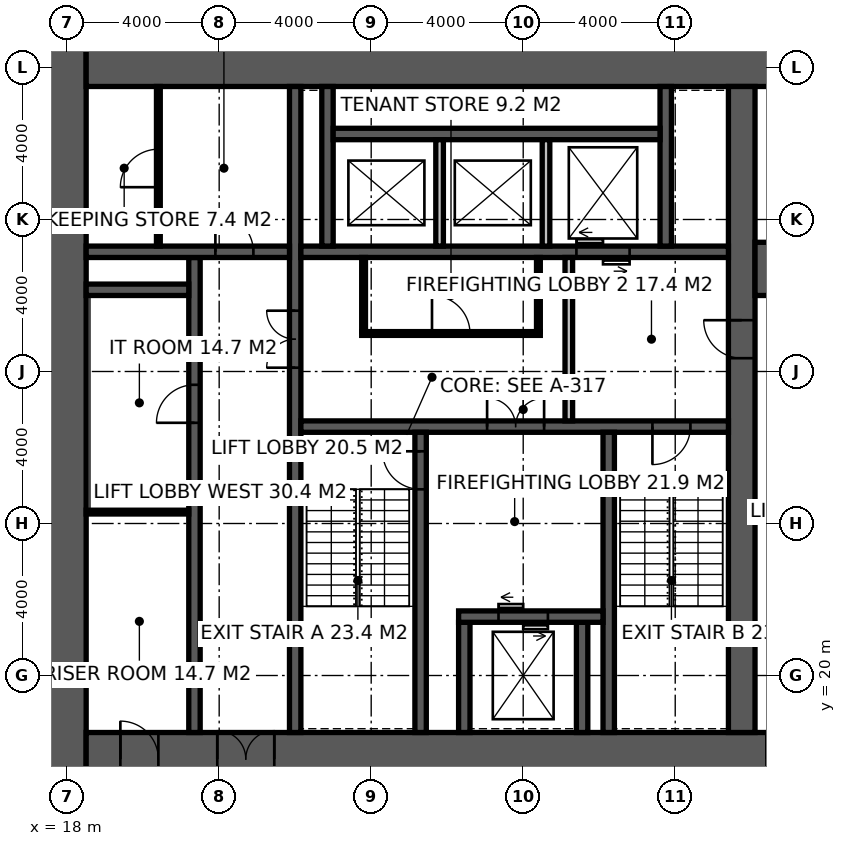
"""IFC4 building model, lengths in metres.
Left out: names, types, materials, properties, quantities, classifications, styles, units other than length and angle.
Written with IfcOpenShell. Run it as: python <this file> out.ifc"""

import sys

from ifc_helpers import new_model, si_unit, direction, frame, frame_2d, origin, place, context, subcontext, project, spatial, rectangle, extrude, element, fill, save


model = new_model("IFC4")
c1 = context("Model", 3, precision=1e-05, world=origin(), true_north=direction((0.0, 1.0)))
c2 = subcontext(c1, "Body", "Model", "MODEL_VIEW")
j1 = project(units=[si_unit("LENGTHUNIT", "METRE"), si_unit("PLANEANGLEUNIT", "RADIAN")], contexts=[c1])
p1 = place(None, origin())
s1 = spatial("IfcSite", under=j1, at=p1, CompositionType="ELEMENT")
p2 = place(p1, origin())
s2 = spatial("IfcBuilding", under=s1, at=p2, CompositionType="ELEMENT")
p3 = place(p2, frame((0.0, 0.0, 67.0)))
s3 = spatial("IfcBuildingStorey", under=s2, at=p3, CompositionType="ELEMENT", Elevation=67.0)
p4 = place(p3, frame((18.0, 17.1, -0.15), z_axis=(0.0, 0.0, 1.0), x_axis=(0.0, 1.0, 0.0)))
e1 = element("IfcWall", 1, at=p4, inside=s3, PredefinedType="SHEAR", context=c2, shape_type="SweptSolid", body=[
    extrude(rectangle(XDim=19.8, YDim=1.0, at=frame_2d((9.9, 0.0))), origin(), (0.0, 0.0, 1.0), 4.0),
])
p5 = place(p3, frame((18.5, 17.8, -0.15), z_axis=(0.0, 0.0, 1.0), x_axis=(1.0, 0.0, 0.0)))
e2 = element("IfcWall", 2, at=p5, inside=s3, PredefinedType="SHEAR", context=c2, shape_type="SweptSolid", body=[
    extrude(rectangle(XDim=23.7, YDim=1.4, at=frame_2d((11.85, 0.0))), origin(), (0.0, 0.0, 1.0), 4.0),
])
p6 = place(p5, frame((3.45, 0.0, 0.15)))
e3 = element("IfcOpeningElement", 3, at=p6, cuts=e2, PredefinedType="OPENING", context=c2, shape_type="SweptSolid", body=[
    extrude(rectangle(XDim=1.5, YDim=2.4, at=frame_2d((0.75, 1.2))), frame((0.0, 0.71, 0.0), z_axis=(0.0, -1.0, 0.0), x_axis=(1.0, 0.0, 0.0)), (0.0, 0.0, 1.0), 1.42),
])
p7 = place(p5, frame((17.9, 0.0, 0.15)))
e4 = element("IfcOpeningElement", 4, at=p7, cuts=e2, PredefinedType="OPENING", context=c2, shape_type="SweptSolid", body=[
    extrude(rectangle(XDim=1.5, YDim=2.4, at=frame_2d((0.75, 1.2))), frame((0.0, 0.71, 0.0), z_axis=(0.0, -1.0, 0.0), x_axis=(1.0, 0.0, 0.0)), (0.0, 0.0, 1.0), 1.42),
])
p8 = place(p5, frame((0.9, 0.0, 0.15)))
e5 = element("IfcOpeningElement", 5, at=p8, cuts=e2, PredefinedType="OPENING", context=c2, shape_type="SweptSolid", body=[
    extrude(rectangle(XDim=1.0, YDim=2.2, at=frame_2d((0.5, 1.1))), frame((0.0, 0.71, 0.0), z_axis=(0.0, -1.0, 0.0), x_axis=(1.0, 0.0, 0.0)), (0.0, 0.0, 1.0), 1.42),
])
p9 = place(p3, frame((18.5, 36.2, -0.15), z_axis=(0.0, 0.0, 1.0), x_axis=(1.0, 0.0, 0.0)))
e6 = element("IfcWall", 6, at=p9, inside=s3, PredefinedType="SHEAR", context=c2, shape_type="SweptSolid", body=[
    extrude(rectangle(XDim=23.7, YDim=1.4, at=frame_2d((11.85, 0.0))), origin(), (0.0, 0.0, 1.0), 4.0),
])
p10 = place(p3, frame((35.75, 18.5, -0.15), z_axis=(0.0, 0.0, 1.0), x_axis=(0.0, 1.0, 0.0)))
e7 = element("IfcWall", 7, at=p10, inside=s3, PredefinedType="SHEAR", context=c2, shape_type="SweptSolid", body=[
    extrude(rectangle(XDim=17.0, YDim=0.7, at=frame_2d((8.5, 0.0))), origin(), (0.0, 0.0, 1.0), 4.0),
])
p11 = place(p10, frame((9.85, 0.0, 0.15)))
e8 = element("IfcOpeningElement", 8, at=p11, cuts=e7, PredefinedType="OPENING", context=c2, shape_type="SweptSolid", body=[
    extrude(rectangle(XDim=1.0, YDim=2.2, at=frame_2d((0.5, 1.1))), frame((0.0, 0.36, 0.0), z_axis=(0.0, -1.0, 0.0), x_axis=(1.0, 0.0, 0.0)), (0.0, 0.0, 1.0), 0.72),
])
p12 = place(p3, frame((24.0, 18.5, -0.15), z_axis=(0.0, 0.0, 1.0), x_axis=(0.0, 1.0, 0.0)))
e9 = element("IfcWall", 9, at=p12, inside=s3, PredefinedType="SHEAR", context=c2, shape_type="SweptSolid", body=[
    extrude(rectangle(XDim=17.0, YDim=0.3, at=frame_2d((8.5, 0.0))), origin(), (0.0, 0.0, 1.0), 4.0),
])
p13 = place(p12, frame((9.6, 0.0, 0.15)))
e10 = element("IfcOpeningElement", 10, at=p13, cuts=e9, PredefinedType="OPENING", context=c2, shape_type="SweptSolid", body=[
    extrude(rectangle(XDim=1.5, YDim=2.4, at=frame_2d((0.75, 1.2))), frame((0.0, 0.16, 0.0), z_axis=(0.0, -1.0, 0.0), x_axis=(1.0, 0.0, 0.0)), (0.0, 0.0, 1.0), 0.32),
])
p14 = place(p3, frame((24.15, 26.55, -0.15), z_axis=(0.0, 0.0, 1.0), x_axis=(1.0, 0.0, 0.0)))
e11 = element("IfcWall", 11, at=p14, inside=s3, PredefinedType="SHEAR", context=c2, shape_type="SweptSolid", body=[
    extrude(rectangle(XDim=11.25, YDim=0.3, at=frame_2d((5.625, 0.0))), origin(), (0.0, 0.0, 1.0), 4.0),
])
p15 = place(p14, frame((9.25, 0.0, 0.15)))
e12 = element("IfcOpeningElement", 12, at=p15, cuts=e11, PredefinedType="OPENING", context=c2, shape_type="SweptSolid", body=[
    extrude(rectangle(XDim=1.0, YDim=2.2, at=frame_2d((0.5, 1.1))), frame((0.0, 0.16, 0.0), z_axis=(0.0, -1.0, 0.0), x_axis=(1.0, 0.0, 0.0)), (0.0, 0.0, 1.0), 0.32),
])
p16 = place(p14, frame((4.9, 0.0, 0.15)))
e13 = element("IfcOpeningElement", 13, at=p16, cuts=e11, PredefinedType="OPENING", context=c2, shape_type="SweptSolid", body=[
    extrude(rectangle(XDim=1.5, YDim=2.4, at=frame_2d((0.75, 1.2))), frame((0.0, 0.16, 0.0), z_axis=(0.0, -1.0, 0.0), x_axis=(1.0, 0.0, 0.0)), (0.0, 0.0, 1.0), 0.32),
])
p17 = place(p3, frame((27.3, 18.5, -0.15), z_axis=(0.0, 0.0, 1.0), x_axis=(0.0, 1.0, 0.0)))
e14 = element("IfcWall", 14, at=p17, inside=s3, PredefinedType="SHEAR", context=c2, shape_type="SweptSolid", body=[
    extrude(rectangle(XDim=7.9, YDim=0.3, at=frame_2d((3.95, 0.0))), origin(), (0.0, 0.0, 1.0), 4.0),
])
p18 = place(p17, frame((6.4, 0.0, 0.15)))
e15 = element("IfcOpeningElement", 15, at=p18, cuts=e14, PredefinedType="OPENING", context=c2, shape_type="SweptSolid", body=[
    extrude(rectangle(XDim=1.0, YDim=2.2, at=frame_2d((0.5, 1.1))), frame((0.0, 0.16, 0.0), z_axis=(0.0, -1.0, 0.0), x_axis=(1.0, 0.0, 0.0)), (0.0, 0.0, 1.0), 0.32),
])
p19 = place(p3, frame((32.25, 18.5, -0.15), z_axis=(0.0, 0.0, 1.0), x_axis=(0.0, 1.0, 0.0)))
e16 = element("IfcWall", 16, at=p19, inside=s3, PredefinedType="SHEAR", context=c2, shape_type="SweptSolid", body=[
    extrude(rectangle(XDim=7.9, YDim=0.3, at=frame_2d((3.95, 0.0))), origin(), (0.0, 0.0, 1.0), 4.0),
])
for number, where, z_axis, x_axis in (
    (17, (28.45, 18.5, -0.15), (0.0, 0.0, 1.0), (0.0, 1.0, 0.0)),
    (18, (31.55, 18.5, -0.15), (0.0, 0.0, 1.0), (0.0, 1.0, 0.0)),
):
    element("IfcWall", number, at=place(p3, frame(where, z_axis=z_axis, x_axis=x_axis)), inside=s3, PredefinedType="SHEAR", context=c2, shape_type="SweptSolid", body=[
        extrude(rectangle(XDim=2.9, YDim=0.3, at=frame_2d((1.45, 0.0))), origin(), (0.0, 0.0, 1.0), 4.0),
    ])
p20 = place(p3, frame((28.3, 21.55, -0.15), z_axis=(0.0, 0.0, 1.0), x_axis=(1.0, 0.0, 0.0)))
e19 = element("IfcWall", 19, at=p20, inside=s3, PredefinedType="SHEAR", context=c2, shape_type="SweptSolid", body=[
    extrude(rectangle(XDim=3.8, YDim=0.3, at=frame_2d((1.9, 0.0))), origin(), (0.0, 0.0, 1.0), 4.0),
])
p21 = place(p20, frame((1.05, 0.0, 0.15)))
e20 = element("IfcOpeningElement", 20, at=p21, cuts=e19, PredefinedType="OPENING", context=c2, shape_type="SweptSolid", body=[
    extrude(rectangle(XDim=1.3, YDim=2.4, at=frame_2d((0.65, 1.2))), frame((0.0, 0.16, 0.0), z_axis=(0.0, -1.0, 0.0), x_axis=(1.0, 0.0, 0.0)), (0.0, 0.0, 1.0), 0.32),
])
p22 = place(p3, frame((24.15, 31.15, -0.15), z_axis=(0.0, 0.0, 1.0), x_axis=(1.0, 0.0, 0.0)))
e21 = element("IfcWall", 21, at=p22, inside=s3, PredefinedType="SHEAR", context=c2, shape_type="SweptSolid", body=[
    extrude(rectangle(XDim=11.25, YDim=0.3, at=frame_2d((5.625, 0.0))), origin(), (0.0, 0.0, 1.0), 4.0),
])
p23 = place(p22, frame((7.25, 0.0, 0.15)))
e22 = element("IfcOpeningElement", 22, at=p23, cuts=e21, PredefinedType="OPENING", context=c2, shape_type="SweptSolid", body=[
    extrude(rectangle(XDim=1.4, YDim=2.4, at=frame_2d((0.7, 1.2))), frame((0.0, 0.16, 0.0), z_axis=(0.0, -1.0, 0.0), x_axis=(1.0, 0.0, 0.0)), (0.0, 0.0, 1.0), 0.32),
])
p24 = place(p3, frame((21.35, 18.5, -0.15), z_axis=(0.0, 0.0, 1.0), x_axis=(0.0, 1.0, 0.0)))
e23 = element("IfcWall", 23, at=p24, inside=s3, PredefinedType="SHEAR", context=c2, shape_type="SweptSolid", body=[
    extrude(rectangle(XDim=12.5, YDim=0.3, at=frame_2d((6.25, 0.0))), origin(), (0.0, 0.0, 1.0), 4.0),
])
p25 = place(p24, frame((8.15, 0.0, 0.15)))
e24 = element("IfcOpeningElement", 24, at=p25, cuts=e23, PredefinedType="OPENING", context=c2, shape_type="SweptSolid", body=[
    extrude(rectangle(XDim=1.0, YDim=2.2, at=frame_2d((0.5, 1.1))), frame((0.0, 0.16, 0.0), z_axis=(0.0, -1.0, 0.0), x_axis=(1.0, 0.0, 0.0)), (0.0, 0.0, 1.0), 0.32),
])
p26 = place(p3, frame((18.5, 31.15, -0.15), z_axis=(0.0, 0.0, 1.0), x_axis=(1.0, 0.0, 0.0)))
e25 = element("IfcWall", 25, at=p26, inside=s3, PredefinedType="SHEAR", context=c2, shape_type="SweptSolid", body=[
    extrude(rectangle(XDim=5.35, YDim=0.3, at=frame_2d((2.675, 0.0))), origin(), (0.0, 0.0, 1.0), 4.0),
])
p27 = place(p26, frame((3.4, 0.0, 0.15)))
e26 = element("IfcOpeningElement", 26, at=p27, cuts=e25, PredefinedType="OPENING", context=c2, shape_type="SweptSolid", body=[
    extrude(rectangle(XDim=1.0, YDim=2.2, at=frame_2d((0.5, 1.1))), frame((0.0, 0.16, 0.0), z_axis=(0.0, -1.0, 0.0), x_axis=(1.0, 0.0, 0.0)), (0.0, 0.0, 1.0), 0.32),
])
p28 = place(p3, frame((18.5, 30.15, -0.15), z_axis=(0.0, 0.0, 1.0), x_axis=(1.0, 0.0, 0.0)))
e27 = element("IfcWall", 27, at=p28, inside=s3, PredefinedType="SHEAR", context=c2, shape_type="SweptSolid", body=[
    extrude(rectangle(XDim=2.7, YDim=0.3, at=frame_2d((1.35, 0.0))), origin(), (0.0, 0.0, 1.0), 4.0),
])
for number, where, z_axis, x_axis in (
    (28, (24.85, 31.3, -0.15), (0.0, 0.0, 1.0), (0.0, 1.0, 0.0)),
    (29, (33.75, 31.3, -0.15), (0.0, 0.0, 1.0), (0.0, 1.0, 0.0)),
):
    element("IfcWall", number, at=place(p3, frame(where, z_axis=z_axis, x_axis=x_axis)), inside=s3, PredefinedType="SHEAR", context=c2, shape_type="SweptSolid", body=[
        extrude(rectangle(XDim=4.2, YDim=0.3, at=frame_2d((2.1, 0.0))), origin(), (0.0, 0.0, 1.0), 4.0),
    ])
p29 = place(p3, frame((25.0, 34.25, -0.15), z_axis=(0.0, 0.0, 1.0), x_axis=(1.0, 0.0, 0.0)))
e30 = element("IfcWall", 30, at=p29, inside=s3, PredefinedType="SHEAR", context=c2, shape_type="SweptSolid", body=[
    extrude(rectangle(XDim=8.6, YDim=0.3, at=frame_2d((4.3, 0.0))), origin(), (0.0, 0.0, 1.0), 4.0),
])
for number, where, z_axis, x_axis in (
    (31, (27.8, 31.3, -0.15), (0.0, 0.0, 1.0), (0.0, 1.0, 0.0)),
    (32, (30.6, 31.3, -0.15), (0.0, 0.0, 1.0), (0.0, 1.0, 0.0)),
):
    element("IfcWall", number, at=place(p3, frame(where, z_axis=z_axis, x_axis=x_axis)), inside=s3, PredefinedType="SOLIDWALL", context=c2, shape_type="SweptSolid", body=[
        extrude(rectangle(XDim=2.8, YDim=0.2, at=frame_2d((1.4, 0.0))), origin(), (0.0, 0.0, 1.0), 4.0),
    ])
p30 = place(p3, frame((36.1, 30.7, -0.15), z_axis=(0.0, 0.0, 1.0), x_axis=(1.0, 0.0, 0.0)))
e33 = element("IfcWall", 33, at=p30, inside=s3, PredefinedType="SHEAR", context=c2, shape_type="SweptSolid", body=[
    extrude(rectangle(XDim=6.1, YDim=1.4, at=frame_2d((3.05, 0.0))), origin(), (0.0, 0.0, 1.0), 4.0),
])
p31 = place(p30, frame((0.6, 0.0, 0.15)))
e34 = element("IfcOpeningElement", 34, at=p31, cuts=e33, PredefinedType="OPENING", context=c2, shape_type="SweptSolid", body=[
    extrude(rectangle(XDim=1.0, YDim=2.2, at=frame_2d((0.5, 1.1))), frame((0.0, 0.71, 0.0), z_axis=(0.0, -1.0, 0.0), x_axis=(1.0, 0.0, 0.0)), (0.0, 0.0, 1.0), 1.42),
])
p32 = place(p3, frame((31.2, 26.7, 0.0), z_axis=(0.0, 0.0, 1.0), x_axis=(0.0, 1.0, 0.0)))
e35 = element("IfcWall", 35, at=p32, inside=s3, PredefinedType="SOLIDWALL", context=c2, shape_type="SweptSolid", body=[
    extrude(rectangle(XDim=4.3, YDim=0.2, at=frame_2d((2.15, 0.0))), origin(), (0.0, 0.0, 1.0), 3.85),
])
p33 = place(p3, frame((20.4, 31.3, 0.0), z_axis=(0.0, 0.0, 1.0), x_axis=(0.0, 1.0, 0.0)))
e36 = element("IfcWall", 36, at=p33, inside=s3, PredefinedType="PARTITIONING", context=c2, shape_type="SweptSolid", body=[
    extrude(rectangle(XDim=4.2, YDim=0.1, at=frame_2d((2.1, 0.0))), origin(), (0.0, 0.0, 1.0), 3.85),
])
p34 = place(p33, frame((1.55, 0.0, 0.0)))
e37 = element("IfcOpeningElement", 37, at=p34, cuts=e36, PredefinedType="OPENING", context=c2, shape_type="SweptSolid", body=[
    extrude(rectangle(XDim=1.0, YDim=2.2, at=frame_2d((0.5, 1.1))), frame((0.0, 0.06, 0.0), z_axis=(0.0, -1.0, 0.0), x_axis=(1.0, 0.0, 0.0)), (0.0, 0.0, 1.0), 0.12),
])
p35 = place(p3, frame((25.75, 29.0, 0.0), z_axis=(0.0, 0.0, 1.0), x_axis=(1.0, 0.0, 0.0)))
e38 = element("IfcWall", 38, at=p35, inside=s3, PredefinedType="PARTITIONING", context=c2, shape_type="SweptSolid", body=[
    extrude(rectangle(XDim=4.7, YDim=0.1, at=frame_2d((2.35, 0.0))), origin(), (0.0, 0.0, 1.0), 3.85),
])
p36 = place(p35, frame((1.85, 0.0, 0.0)))
e39 = element("IfcOpeningElement", 39, at=p36, cuts=e38, PredefinedType="OPENING", context=c2, shape_type="SweptSolid", body=[
    extrude(rectangle(XDim=1.0, YDim=2.2, at=frame_2d((0.5, 1.1))), frame((0.0, 0.06, 0.0), z_axis=(0.0, -1.0, 0.0), x_axis=(1.0, 0.0, 0.0)), (0.0, 0.0, 1.0), 0.12),
])
for number, where, z_axis, x_axis in (
    (40, (25.8, 29.05, 0.0), (0.0, 0.0, 1.0), (0.0, 1.0, 0.0)),
    (41, (30.4, 29.05, 0.0), (0.0, 0.0, 1.0), (0.0, 1.0, 0.0)),
):
    element("IfcWall", number, at=place(p3, frame(where, z_axis=z_axis, x_axis=x_axis)), inside=s3, PredefinedType="PARTITIONING", context=c2, shape_type="SweptSolid", body=[
        extrude(rectangle(XDim=1.95, YDim=0.1, at=frame_2d((0.975, 0.0))), origin(), (0.0, 0.0, 1.0), 3.85),
    ])
p37 = place(p3, frame((18.5, 24.3, 0.0), z_axis=(0.0, 0.0, 1.0), x_axis=(1.0, 0.0, 0.0)))
e42 = element("IfcWall", 42, at=p37, inside=s3, PredefinedType="PARTITIONING", context=c2, shape_type="SweptSolid", body=[
    extrude(rectangle(XDim=2.7, YDim=0.1, at=frame_2d((1.35, 0.0))), origin(), (0.0, 0.0, 1.0), 3.85),
])
p38 = place(p18, origin())
e43 = element("IfcDoor", 43, at=p38, inside=s3, OperationType="SINGLE_SWING_RIGHT", PredefinedType="DOOR", context=c2, shape_type="SweptSolid", body=[
    extrude(rectangle(XDim=1.0, YDim=2.2, at=frame_2d((0.5, 1.1))), frame((0.0, 0.025, 0.0), z_axis=(0.0, -1.0, 0.0), x_axis=(1.0, 0.0, 0.0)), (0.0, 0.0, 1.0), 0.05),
])
fill(e15, e43)
p39 = place(p15, frame((1.0, 0.0, 0.0), z_axis=(0.0, 0.0, 1.0), x_axis=(-1.0, 0.0, 0.0)))
e44 = element("IfcDoor", 44, at=p39, inside=s3, OperationType="SINGLE_SWING_RIGHT", PredefinedType="DOOR", context=c2, shape_type="SweptSolid", body=[
    extrude(rectangle(XDim=1.0, YDim=2.2, at=frame_2d((0.5, 1.1))), frame((0.0, 0.025, 0.0), z_axis=(0.0, -1.0, 0.0), x_axis=(1.0, 0.0, 0.0)), (0.0, 0.0, 1.0), 0.05),
])
fill(e12, e44)
p40 = place(p11, origin())
e45 = element("IfcDoor", 45, at=p40, inside=s3, OperationType="SINGLE_SWING_RIGHT", PredefinedType="DOOR", context=c2, shape_type="SweptSolid", body=[
    extrude(rectangle(XDim=1.0, YDim=2.2, at=frame_2d((0.5, 1.1))), frame((0.0, 0.025, 0.0), z_axis=(0.0, -1.0, 0.0), x_axis=(1.0, 0.0, 0.0)), (0.0, 0.0, 1.0), 0.05),
])
fill(e8, e45)
p41 = place(p16, origin())
e46 = element("IfcDoor", 46, at=p41, inside=s3, OperationType="DOUBLE_DOOR_DOUBLE_SWING", PredefinedType="DOOR", context=c2, shape_type="SweptSolid", body=[
    extrude(rectangle(XDim=1.5, YDim=2.4, at=frame_2d((0.75, 1.2))), frame((0.0, 0.025, 0.0), z_axis=(0.0, -1.0, 0.0), x_axis=(1.0, 0.0, 0.0)), (0.0, 0.0, 1.0), 0.05),
])
fill(e13, e46)
p42 = place(p13, origin())
e47 = element("IfcDoor", 47, at=p42, inside=s3, OperationType="DOUBLE_DOOR_DOUBLE_SWING", PredefinedType="DOOR", context=c2, shape_type="SweptSolid", body=[
    extrude(rectangle(XDim=1.5, YDim=2.4, at=frame_2d((0.75, 1.2))), frame((0.0, 0.025, 0.0), z_axis=(0.0, -1.0, 0.0), x_axis=(1.0, 0.0, 0.0)), (0.0, 0.0, 1.0), 0.05),
])
fill(e10, e47)
p43 = place(p27, origin())
e48 = element("IfcDoor", 48, at=p43, inside=s3, OperationType="SINGLE_SWING_LEFT", PredefinedType="DOOR", context=c2, shape_type="SweptSolid", body=[
    extrude(rectangle(XDim=1.0, YDim=2.2, at=frame_2d((0.5, 1.1))), frame((0.0, 0.025, 0.0), z_axis=(0.0, -1.0, 0.0), x_axis=(1.0, 0.0, 0.0)), (0.0, 0.0, 1.0), 0.05),
])
fill(e26, e48)
p44 = place(p34, origin())
e49 = element("IfcDoor", 49, at=p44, inside=s3, OperationType="SINGLE_SWING_LEFT", PredefinedType="DOOR", context=c2, shape_type="SweptSolid", body=[
    extrude(rectangle(XDim=1.0, YDim=2.2, at=frame_2d((0.5, 1.1))), frame((0.0, 0.025, 0.0), z_axis=(0.0, -1.0, 0.0), x_axis=(1.0, 0.0, 0.0)), (0.0, 0.0, 1.0), 0.05),
])
fill(e37, e49)
p45 = place(p36, origin())
e50 = element("IfcDoor", 50, at=p45, inside=s3, OperationType="SINGLE_SWING_LEFT", PredefinedType="DOOR", context=c2, shape_type="SweptSolid", body=[
    extrude(rectangle(XDim=1.0, YDim=2.2, at=frame_2d((0.5, 1.1))), frame((0.0, 0.025, 0.0), z_axis=(0.0, -1.0, 0.0), x_axis=(1.0, 0.0, 0.0)), (0.0, 0.0, 1.0), 0.05),
])
fill(e39, e50)
p46 = place(p25, origin())
e51 = element("IfcDoor", 51, at=p46, inside=s3, OperationType="SINGLE_SWING_LEFT", PredefinedType="DOOR", context=c2, shape_type="SweptSolid", body=[
    extrude(rectangle(XDim=1.0, YDim=2.2, at=frame_2d((0.5, 1.1))), frame((0.0, 0.025, 0.0), z_axis=(0.0, -1.0, 0.0), x_axis=(1.0, 0.0, 0.0)), (0.0, 0.0, 1.0), 0.05),
])
fill(e24, e51)
p47 = place(p6, origin())
e52 = element("IfcDoor", 52, at=p47, inside=s3, OperationType="DOUBLE_DOOR_DOUBLE_SWING", PredefinedType="DOOR", context=c2, shape_type="SweptSolid", body=[
    extrude(rectangle(XDim=1.5, YDim=2.4, at=frame_2d((0.75, 1.2))), frame((0.0, 0.025, 0.0), z_axis=(0.0, -1.0, 0.0), x_axis=(1.0, 0.0, 0.0)), (0.0, 0.0, 1.0), 0.05),
])
fill(e3, e52)
p48 = place(p8, origin())
e53 = element("IfcDoor", 53, at=p48, inside=s3, OperationType="SINGLE_SWING_LEFT", PredefinedType="DOOR", context=c2, shape_type="SweptSolid", body=[
    extrude(rectangle(XDim=1.0, YDim=2.2, at=frame_2d((0.5, 1.1))), frame((0.0, 0.025, 0.0), z_axis=(0.0, -1.0, 0.0), x_axis=(1.0, 0.0, 0.0)), (0.0, 0.0, 1.0), 0.05),
])
fill(e5, e53)
p49 = place(p21, origin())
e54 = element("IfcDoor", 54, at=p49, inside=s3, OperationType="DOUBLE_DOOR_SLIDING", PredefinedType="DOOR", context=c2, shape_type="SweptSolid", body=[
    extrude(rectangle(XDim=1.3, YDim=2.4, at=frame_2d((0.65, 1.2))), frame((0.0, 0.025, 0.0), z_axis=(0.0, -1.0, 0.0), x_axis=(1.0, 0.0, 0.0)), (0.0, 0.0, 1.0), 0.05),
])
fill(e20, e54)
p50 = place(p23, origin())
e55 = element("IfcDoor", 55, at=p50, inside=s3, OperationType="DOUBLE_DOOR_SLIDING", PredefinedType="DOOR", context=c2, shape_type="SweptSolid", body=[
    extrude(rectangle(XDim=1.4, YDim=2.4, at=frame_2d((0.7, 1.2))), frame((0.0, 0.025, 0.0), z_axis=(0.0, -1.0, 0.0), x_axis=(1.0, 0.0, 0.0)), (0.0, 0.0, 1.0), 0.05),
])
fill(e22, e55)
save(model, sys.argv[1])
